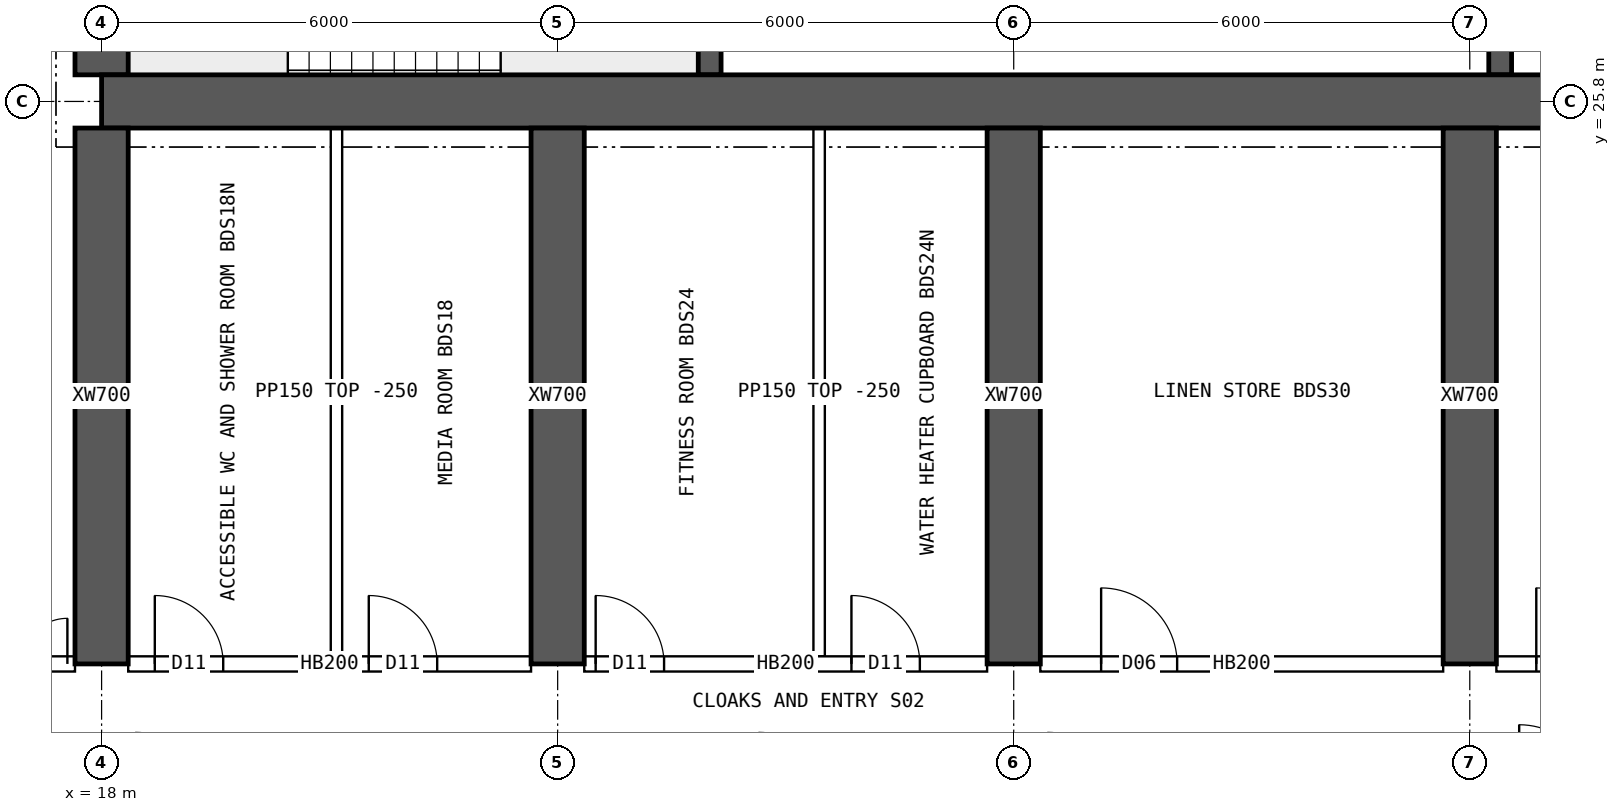
"""IFC4 building model, lengths in metres.
Left out: names, types, materials, properties, quantities, classifications, styles, units other than length and angle.
Written with IfcOpenShell. Run it as: python <this file> out.ifc"""

import sys

from ifc_helpers import new_model, si_unit, direction, frame, frame_2d, origin, place, context, subcontext, project, spatial, rectangle, extrude, element, fill, save


model = new_model("IFC4")
c1 = context("Model", 3, precision=1e-05, world=origin(), true_north=direction((0.0, 1.0)))
c2 = subcontext(c1, "Body", "Model", "MODEL_VIEW")
j1 = project(units=[si_unit("LENGTHUNIT", "METRE"), si_unit("PLANEANGLEUNIT", "RADIAN")], contexts=[c1])
p1 = place(None, origin())
s1 = spatial("IfcSite", under=j1, at=p1, CompositionType="ELEMENT")
p2 = place(p1, origin())
s2 = spatial("IfcBuilding", under=s1, at=p2, CompositionType="ELEMENT")
p3 = place(p2, frame((0.0, 0.0, 216.55)))
s3 = spatial("IfcBuildingStorey", under=s2, at=p3, CompositionType="ELEMENT", Elevation=216.55)
p4 = place(p3, frame((18.0, 25.8, 0.0), z_axis=(0.0, 0.0, 1.0), x_axis=(1.0, 0.0, 0.0)))
e1 = element("IfcWall", 1, at=p4, inside=s3, PredefinedType="SHEAR", context=c2, shape_type="SweptSolid", body=[
    extrude(rectangle(XDim=48.0, YDim=0.7, at=frame_2d((24.0, 0.0))), origin(), (0.0, 0.0, 1.0), 3.75),
])
p5 = place(p3, frame((18.0, 26.15, 0.0), z_axis=(0.0, 0.0, 1.0), x_axis=(0.0, 1.0, 0.0)))
e2 = element("IfcWall", 2, at=p5, inside=s3, PredefinedType="SHEAR", context=c2, shape_type="SweptSolid", body=[
    extrude(rectangle(XDim=11.7, YDim=0.7, at=frame_2d((5.85, 0.0))), origin(), (0.0, 0.0, 1.0), 3.75),
])
p6 = place(p5, frame((5.15, 0.0, 0.0)))
e3 = element("IfcOpeningElement", 3, at=p6, cuts=e2, PredefinedType="OPENING", context=c2, shape_type="SweptSolid", body=[
    extrude(rectangle(XDim=1.2, YDim=2.1, at=frame_2d((0.6, 1.05))), frame((0.0, 0.36, 0.0), z_axis=(0.0, -1.0, 0.0), x_axis=(1.0, 0.0, 0.0)), (0.0, 0.0, 1.0), 0.72),
])
for number, where, z_axis, x_axis in (
    (4, (26.0, 26.15, 0.0), (0.0, 0.0, 1.0), (0.0, 1.0, 0.0)),
    (5, (36.4, 26.15, 0.0), (0.0, 0.0, 1.0), (0.0, 1.0, 0.0)),
):
    element("IfcWall", number, at=place(p3, frame(where, z_axis=z_axis, x_axis=x_axis)), inside=s3, PredefinedType="SHEAR", context=c2, shape_type="SweptSolid", body=[
        extrude(rectangle(XDim=4.1, YDim=0.3, at=frame_2d((2.05, 0.0))), origin(), (0.0, 0.0, 1.0), 3.75),
    ])
for number, where, z_axis, x_axis in (
    (6, (18.0, 18.4, 0.0), (0.0, 0.0, 1.0), (0.0, 1.0, 0.0)),
    (7, (24.0, 18.4, 0.0), (0.0, 0.0, 1.0), (0.0, 1.0, 0.0)),
    (8, (30.0, 18.4, 0.0), (0.0, 0.0, 1.0), (0.0, 1.0, 0.0)),
    (9, (36.0, 18.4, 0.0), (0.0, 0.0, 1.0), (0.0, 1.0, 0.0)),
):
    element("IfcWall", number, at=place(p3, frame(where, z_axis=z_axis, x_axis=x_axis)), inside=s3, PredefinedType="SHEAR", context=c2, shape_type="SweptSolid", body=[
        extrude(rectangle(XDim=7.05, YDim=0.7, at=frame_2d((3.525, 0.0))), origin(), (0.0, 0.0, 1.0), 3.75),
    ])
p7 = place(p3, frame((15.6, 18.4, 0.0), z_axis=(0.0, 0.0, 1.0), x_axis=(1.0, 0.0, 0.0)))
e10 = element("IfcWall", 10, at=p7, inside=s3, PredefinedType="SOLIDWALL", context=c2, shape_type="SweptSolid", body=[
    extrude(rectangle(XDim=2.05, YDim=0.2, at=frame_2d((1.025, 0.0))), origin(), (0.0, 0.0, 1.0), 3.5),
])
p8 = place(p7, frame((0.75, 0.0, 0.0)))
e11 = element("IfcOpeningElement", 11, at=p8, cuts=e10, PredefinedType="OPENING", context=c2, shape_type="SweptSolid", body=[
    extrude(rectangle(XDim=1.2, YDim=2.1, at=frame_2d((0.6, 1.05))), frame((0.0, 0.11, 0.0), z_axis=(0.0, -1.0, 0.0), x_axis=(1.0, 0.0, 0.0)), (0.0, 0.0, 1.0), 0.22),
])
p9 = place(p3, frame((18.35, 18.4, 0.0), z_axis=(0.0, 0.0, 1.0), x_axis=(1.0, 0.0, 0.0)))
e12 = element("IfcWall", 12, at=p9, inside=s3, PredefinedType="SOLIDWALL", context=c2, shape_type="SweptSolid", body=[
    extrude(rectangle(XDim=5.3, YDim=0.2, at=frame_2d((2.65, 0.0))), origin(), (0.0, 0.0, 1.0), 3.5),
])
p10 = place(p9, frame((0.35, 0.0, 0.0)))
e13 = element("IfcOpeningElement", 13, at=p10, cuts=e12, PredefinedType="OPENING", context=c2, shape_type="SweptSolid", body=[
    extrude(rectangle(XDim=0.9, YDim=2.1, at=frame_2d((0.45, 1.05))), frame((0.0, 0.11, 0.0), z_axis=(0.0, -1.0, 0.0), x_axis=(1.0, 0.0, 0.0)), (0.0, 0.0, 1.0), 0.22),
])
p11 = place(p9, frame((3.165, 0.0, 0.0)))
e14 = element("IfcOpeningElement", 14, at=p11, cuts=e12, PredefinedType="OPENING", context=c2, shape_type="SweptSolid", body=[
    extrude(rectangle(XDim=0.9, YDim=2.1, at=frame_2d((0.45, 1.05))), frame((0.0, 0.11, 0.0), z_axis=(0.0, -1.0, 0.0), x_axis=(1.0, 0.0, 0.0)), (0.0, 0.0, 1.0), 0.22),
])
p12 = place(p3, frame((24.35, 18.4, 0.0), z_axis=(0.0, 0.0, 1.0), x_axis=(1.0, 0.0, 0.0)))
e15 = element("IfcWall", 15, at=p12, inside=s3, PredefinedType="SOLIDWALL", context=c2, shape_type="SweptSolid", body=[
    extrude(rectangle(XDim=5.3, YDim=0.2, at=frame_2d((2.65, 0.0))), origin(), (0.0, 0.0, 1.0), 3.5),
])
p13 = place(p12, frame((0.15, 0.0, 0.0)))
e16 = element("IfcOpeningElement", 16, at=p13, cuts=e15, PredefinedType="OPENING", context=c2, shape_type="SweptSolid", body=[
    extrude(rectangle(XDim=0.9, YDim=2.1, at=frame_2d((0.45, 1.05))), frame((0.0, 0.11, 0.0), z_axis=(0.0, -1.0, 0.0), x_axis=(1.0, 0.0, 0.0)), (0.0, 0.0, 1.0), 0.22),
])
p14 = place(p12, frame((3.515, 0.0, 0.0)))
e17 = element("IfcOpeningElement", 17, at=p14, cuts=e15, PredefinedType="OPENING", context=c2, shape_type="SweptSolid", body=[
    extrude(rectangle(XDim=0.9, YDim=2.1, at=frame_2d((0.45, 1.05))), frame((0.0, 0.11, 0.0), z_axis=(0.0, -1.0, 0.0), x_axis=(1.0, 0.0, 0.0)), (0.0, 0.0, 1.0), 0.22),
])
p15 = place(p3, frame((30.35, 18.4, 0.0), z_axis=(0.0, 0.0, 1.0), x_axis=(1.0, 0.0, 0.0)))
e18 = element("IfcWall", 18, at=p15, inside=s3, PredefinedType="SOLIDWALL", context=c2, shape_type="SweptSolid", body=[
    extrude(rectangle(XDim=5.3, YDim=0.2, at=frame_2d((2.65, 0.0))), origin(), (0.0, 0.0, 1.0), 3.5),
])
p16 = place(p15, frame((0.8, 0.0, 0.0)))
e19 = element("IfcOpeningElement", 19, at=p16, cuts=e18, PredefinedType="OPENING", context=c2, shape_type="SweptSolid", body=[
    extrude(rectangle(XDim=1.0, YDim=2.1, at=frame_2d((0.5, 1.05))), frame((0.0, 0.11, 0.0), z_axis=(0.0, -1.0, 0.0), x_axis=(1.0, 0.0, 0.0)), (0.0, 0.0, 1.0), 0.22),
])
p17 = place(p3, frame((36.35, 18.4, 0.0), z_axis=(0.0, 0.0, 1.0), x_axis=(1.0, 0.0, 0.0)))
e20 = element("IfcWall", 20, at=p17, inside=s3, PredefinedType="SOLIDWALL", context=c2, shape_type="SweptSolid", body=[
    extrude(rectangle(XDim=5.3, YDim=0.2, at=frame_2d((2.65, 0.0))), origin(), (0.0, 0.0, 1.0), 3.5),
])
p18 = place(p17, frame((0.525, 0.0, 0.0)))
e21 = element("IfcOpeningElement", 21, at=p18, cuts=e20, PredefinedType="OPENING", context=c2, shape_type="SweptSolid", body=[
    extrude(rectangle(XDim=1.0, YDim=2.1, at=frame_2d((0.5, 1.05))), frame((0.0, 0.11, 0.0), z_axis=(0.0, -1.0, 0.0), x_axis=(1.0, 0.0, 0.0)), (0.0, 0.0, 1.0), 0.22),
])
for number, where, z_axis, x_axis in (
    (22, (21.09, 18.5, 0.0), (0.0, 0.0, 1.0), (0.0, 1.0, 0.0)),
    (23, (27.44, 18.5, 0.0), (0.0, 0.0, 1.0), (0.0, 1.0, 0.0)),
):
    element("IfcWall", number, at=place(p3, frame(where, z_axis=z_axis, x_axis=x_axis)), inside=s3, PredefinedType="PARTITIONING", context=c2, shape_type="SweptSolid", body=[
        extrude(rectangle(XDim=6.95, YDim=0.15, at=frame_2d((3.475, 0.0))), origin(), (0.0, 0.0, 1.0), 3.5),
    ])
p19 = place(p8, origin())
e24 = element("IfcDoor", 24, at=p19, inside=s3, OperationType="DOUBLE_DOOR_SINGLE_SWING", PredefinedType="DOOR", context=c2, shape_type="SweptSolid", body=[
    extrude(rectangle(XDim=1.2, YDim=2.1, at=frame_2d((0.6, 1.05))), frame((0.0, 0.025, 0.0), z_axis=(0.0, -1.0, 0.0), x_axis=(1.0, 0.0, 0.0)), (0.0, 0.0, 1.0), 0.05),
])
fill(e11, e24)
p20 = place(p10, origin())
e25 = element("IfcDoor", 25, at=p20, inside=s3, OperationType="SINGLE_SWING_LEFT", PredefinedType="DOOR", context=c2, shape_type="SweptSolid", body=[
    extrude(rectangle(XDim=0.9, YDim=2.1, at=frame_2d((0.45, 1.05))), frame((0.0, 0.025, 0.0), z_axis=(0.0, -1.0, 0.0), x_axis=(1.0, 0.0, 0.0)), (0.0, 0.0, 1.0), 0.05),
])
fill(e13, e25)
p21 = place(p11, origin())
e26 = element("IfcDoor", 26, at=p21, inside=s3, OperationType="SINGLE_SWING_LEFT", PredefinedType="DOOR", context=c2, shape_type="SweptSolid", body=[
    extrude(rectangle(XDim=0.9, YDim=2.1, at=frame_2d((0.45, 1.05))), frame((0.0, 0.025, 0.0), z_axis=(0.0, -1.0, 0.0), x_axis=(1.0, 0.0, 0.0)), (0.0, 0.0, 1.0), 0.05),
])
fill(e14, e26)
p22 = place(p13, origin())
e27 = element("IfcDoor", 27, at=p22, inside=s3, OperationType="SINGLE_SWING_LEFT", PredefinedType="DOOR", context=c2, shape_type="SweptSolid", body=[
    extrude(rectangle(XDim=0.9, YDim=2.1, at=frame_2d((0.45, 1.05))), frame((0.0, 0.025, 0.0), z_axis=(0.0, -1.0, 0.0), x_axis=(1.0, 0.0, 0.0)), (0.0, 0.0, 1.0), 0.05),
])
fill(e16, e27)
p23 = place(p14, origin())
e28 = element("IfcDoor", 28, at=p23, inside=s3, OperationType="SINGLE_SWING_LEFT", PredefinedType="DOOR", context=c2, shape_type="SweptSolid", body=[
    extrude(rectangle(XDim=0.9, YDim=2.1, at=frame_2d((0.45, 1.05))), frame((0.0, 0.025, 0.0), z_axis=(0.0, -1.0, 0.0), x_axis=(1.0, 0.0, 0.0)), (0.0, 0.0, 1.0), 0.05),
])
fill(e17, e28)
p24 = place(p16, origin())
e29 = element("IfcDoor", 29, at=p24, inside=s3, OperationType="SINGLE_SWING_LEFT", PredefinedType="DOOR", context=c2, shape_type="SweptSolid", body=[
    extrude(rectangle(XDim=1.0, YDim=2.1, at=frame_2d((0.5, 1.05))), frame((0.0, 0.025, 0.0), z_axis=(0.0, -1.0, 0.0), x_axis=(1.0, 0.0, 0.0)), (0.0, 0.0, 1.0), 0.05),
])
fill(e19, e29)
p25 = place(p18, origin())
e30 = element("IfcDoor", 30, at=p25, inside=s3, OperationType="SINGLE_SWING_LEFT", PredefinedType="DOOR", context=c2, shape_type="SweptSolid", body=[
    extrude(rectangle(XDim=1.0, YDim=2.1, at=frame_2d((0.5, 1.05))), frame((0.0, 0.025, 0.0), z_axis=(0.0, -1.0, 0.0), x_axis=(1.0, 0.0, 0.0)), (0.0, 0.0, 1.0), 0.05),
])
fill(e21, e30)
save(model, sys.argv[1])
